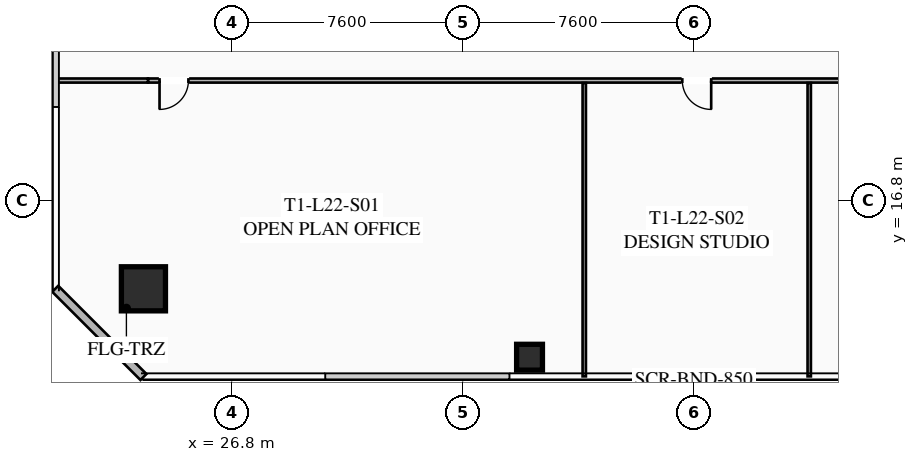
"""IFC4 building model, lengths in metres.
Left out: names, types, materials, properties, quantities, classifications, styles, units other than length and angle.
Written with IfcOpenShell. Run it as: python <this file> out.ifc"""

import sys

from ifc_helpers import new_model, si_unit, direction, frame, frame_2d, origin, origin_2d, place, context, subcontext, project, spatial, rectangle, hollow_rectangle, extrude, element, fill, save


model = new_model("IFC4")
c1 = context("Model", 3, precision=1e-05, world=origin(), true_north=direction((0.0, 1.0)))
c2 = subcontext(c1, "Body", "Model", "MODEL_VIEW")
j1 = project(units=[si_unit("LENGTHUNIT", "METRE"), si_unit("PLANEANGLEUNIT", "RADIAN")], contexts=[c1])
p1 = place(None, origin())
s1 = spatial("IfcSite", under=j1, at=p1, CompositionType="ELEMENT")
p2 = place(p1, origin())
s2 = spatial("IfcBuilding", under=s1, at=p2, CompositionType="ELEMENT")
p3 = place(p2, frame((0.0, 0.0, 84.95)))
s3 = spatial("IfcBuildingStorey", under=s2, at=p3, CompositionType="ELEMENT", Elevation=84.95)
p4 = place(p3, frame((23.9, 13.9, 0.0), z_axis=(0.0, 0.0, 1.0), x_axis=(1.0, 0.0, 0.0)))
e1 = element("IfcColumn", 1, at=p4, inside=s3, PredefinedType="COLUMN", context=c2, shape_type="SweptSolid", body=[
    extrude(hollow_rectangle(XDim=1.45, YDim=1.45, WallThickness=0.055, at=origin_2d()), origin(), (0.0, 0.0, 1.0), 3.35),
])
p5 = place(p3, frame((36.6, 11.65, 0.0), z_axis=(0.0, 0.0, 1.0), x_axis=(1.0, 0.0, 0.0)))
e2 = element("IfcColumn", 2, at=p5, inside=s3, PredefinedType="COLUMN", context=c2, shape_type="SweptSolid", body=[
    extrude(hollow_rectangle(XDim=0.85, YDim=0.85, WallThickness=0.035, at=origin_2d()), origin(), (0.0, 0.0, 1.0), 3.35),
])
p6 = place(p3, frame((23.9, 11.0, 0.0), z_axis=(0.0, 0.0, 1.0), x_axis=(-0.707106781187, 0.707106781187, 0.0)))
e3 = element("IfcWall", 3, at=p6, inside=s3, PredefinedType="SOLIDWALL", context=c2, shape_type="SweptSolid", body=[
    extrude(rectangle(XDim=4.101, YDim=0.28, at=frame_2d((2.051, 0.0))), origin(), (0.0, 0.0, 1.0), 3.35),
])
p7 = place(p3, frame((52.55, 20.75, 0.0), z_axis=(0.0, 0.0, 1.0), x_axis=(-1.0, 0.0, 0.0)))
e4 = element("IfcWall", 4, at=p7, inside=s3, PredefinedType="PARTITIONING", context=c2, shape_type="SweptSolid", body=[
    extrude(rectangle(XDim=28.5, YDim=0.135, at=frame_2d((14.25, 0.0))), origin(), (0.0, 0.0, 1.0), 2.703),
])
p8 = place(p7, frame((27.17, 0.0, 0.0)))
e5 = element("IfcOpeningElement", 5, at=p8, cuts=e4, PredefinedType="OPENING", context=c2, shape_type="SweptSolid", body=[
    extrude(rectangle(XDim=0.95, YDim=2.05, at=frame_2d((0.475, 1.025))), frame((0.0, 0.077, 0.0), z_axis=(0.0, -1.0, 0.0), x_axis=(1.0, 0.0, 0.0)), (0.0, 0.0, 1.0), 0.155),
])
p9 = place(p7, frame((9.975, 0.0, 0.0)))
e6 = element("IfcOpeningElement", 6, at=p9, cuts=e4, PredefinedType="OPENING", context=c2, shape_type="SweptSolid", body=[
    extrude(rectangle(XDim=0.95, YDim=2.05, at=frame_2d((0.475, 1.025))), frame((0.0, 0.077, 0.0), z_axis=(0.0, -1.0, 0.0), x_axis=(1.0, 0.0, 0.0)), (0.0, 0.0, 1.0), 0.155),
])
p10 = place(p7, frame((0.38, 0.0, 0.0)))
e7 = element("IfcOpeningElement", 7, at=p10, cuts=e4, PredefinedType="OPENING", context=c2, shape_type="SweptSolid", body=[
    extrude(rectangle(XDim=0.95, YDim=2.05, at=frame_2d((0.475, 1.025))), frame((0.0, 0.077, 0.0), z_axis=(0.0, -1.0, 0.0), x_axis=(1.0, 0.0, 0.0)), (0.0, 0.0, 1.0), 0.155),
])
p11 = place(p3, frame((21.02, 20.75, 0.0), z_axis=(0.0, 0.0, 1.0), x_axis=(1.0, 0.0, 0.0)))
e8 = element("IfcWall", 8, at=p11, inside=s3, PredefinedType="PARTITIONING", context=c2, shape_type="SweptSolid", body=[
    extrude(rectangle(XDim=3.03, YDim=0.135, at=frame_2d((1.515, 0.0))), origin(), (0.0, 0.0, 1.0), 2.703),
])
for number, where, z_axis, x_axis in (
    (9, (38.4, 11.02, 0.0), (0.0, 0.0, 1.0), (0.0, 1.0, 0.0)),
    (10, (45.8, 11.02, 0.0), (0.0, 0.0, 1.0), (0.0, 1.0, 0.0)),
):
    element("IfcWall", number, at=place(p3, frame(where, z_axis=z_axis, x_axis=x_axis)), inside=s3, PredefinedType="PARTITIONING", context=c2, shape_type="SweptSolid", body=[
        extrude(rectangle(XDim=9.65, YDim=0.11, at=frame_2d((4.825, 0.0))), origin(), (0.0, 0.0, 1.0), 2.703),
    ])
p12 = place(p8, origin())
e11 = element("IfcDoor", 11, at=p12, inside=s3, OperationType="SINGLE_SWING_RIGHT", PredefinedType="DOOR", context=c2, shape_type="SweptSolid", body=[
    extrude(rectangle(XDim=0.95, YDim=2.05, at=frame_2d((0.475, 1.025))), frame((0.0, 0.025, 0.0), z_axis=(0.0, -1.0, 0.0), x_axis=(1.0, 0.0, 0.0)), (0.0, 0.0, 1.0), 0.05),
])
fill(e5, e11)
p13 = place(p9, origin())
e12 = element("IfcDoor", 12, at=p13, inside=s3, OperationType="SINGLE_SWING_LEFT", PredefinedType="DOOR", context=c2, shape_type="SweptSolid", body=[
    extrude(rectangle(XDim=0.95, YDim=2.05, at=frame_2d((0.475, 1.025))), frame((0.0, 0.025, 0.0), z_axis=(0.0, -1.0, 0.0), x_axis=(1.0, 0.0, 0.0)), (0.0, 0.0, 1.0), 0.05),
])
fill(e6, e12)
save(model, sys.argv[1])
